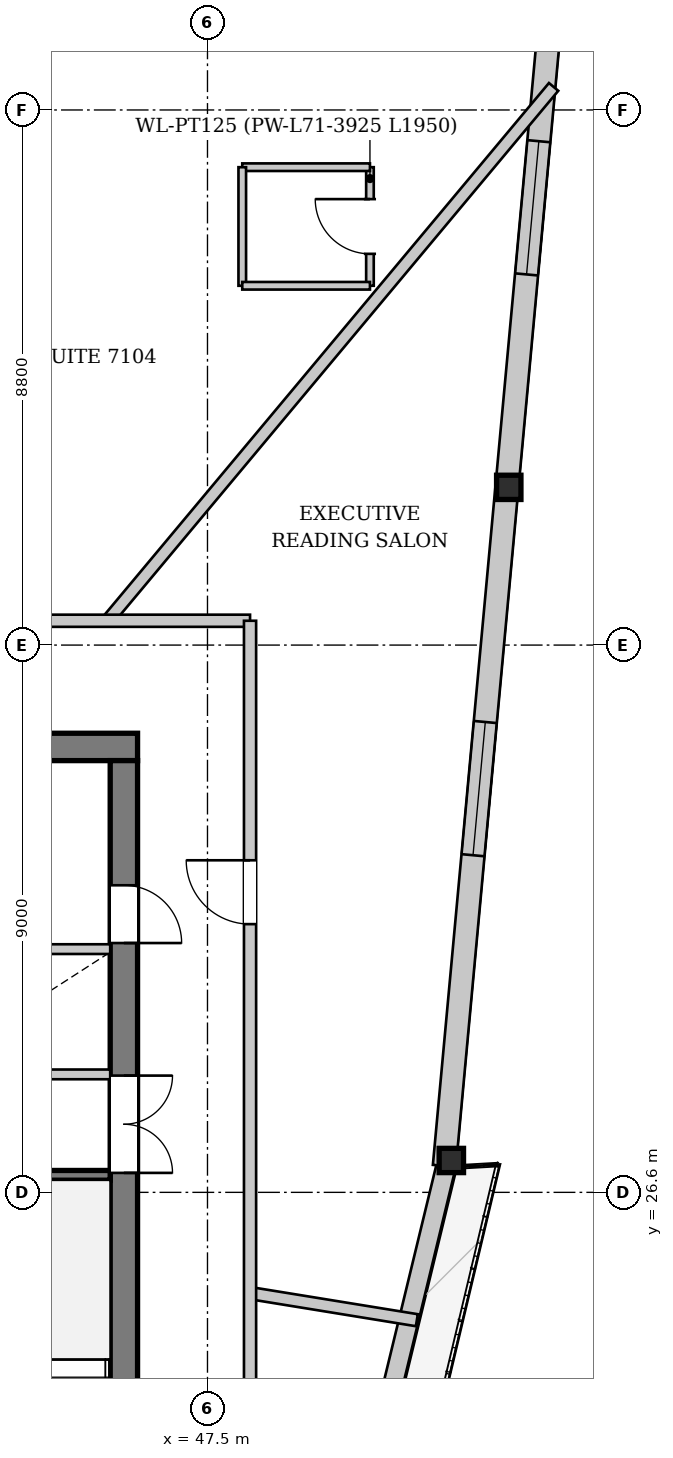
"""IFC4 building model, lengths in metres.
Left out: names, types, materials, properties, quantities, classifications, styles, units other than length and angle.
Written with IfcOpenShell. Run it as: python <this file> out.ifc"""

import sys

from ifc_helpers import new_model, si_unit, direction, frame, frame_2d, origin, origin_2d, place, context, subcontext, project, spatial, rectangle, i_section, extrude, source, transform, mapped, element, fill, save


model = new_model("IFC4")
c1 = context("Model", 3, precision=1e-05, world=origin(), true_north=direction((0.0, 1.0)))
c2 = subcontext(c1, "Body", "Model", "MODEL_VIEW")
j1 = project(units=[si_unit("LENGTHUNIT", "METRE"), si_unit("PLANEANGLEUNIT", "RADIAN")], contexts=[c1])
p1 = place(None, origin())
s1 = spatial("IfcSite", under=j1, at=p1, CompositionType="ELEMENT")
p2 = place(p1, origin())
s2 = spatial("IfcBuilding", under=s1, at=p2, CompositionType="ELEMENT")
p3 = place(p2, frame((0.0, 0.0, 266.9)))
s3 = spatial("IfcBuildingStorey", under=s2, at=p3, CompositionType="ELEMENT", Elevation=266.9)
m1 = source(origin(), c2, "Body", "SweptSolid", [
    extrude(i_section(OverallWidth=0.401, OverallDepth=0.399, WebThickness=0.022, FlangeThickness=0.034, at=origin_2d()), origin(), (0.0, 0.0, 1.0), 3.445),
])
p4 = place(p3, frame((51.585, 27.017, 0.0), z_axis=(-0.043442434865, 0.062151737972, 0.997120813302), x_axis=(-0.819626884118, -0.572897696653, 0.0)))
e1 = element("IfcColumn", 1, at=p4, inside=s3, PredefinedType="COLUMN", context=c2, shape_type="MappedRepresentation", body=[
    mapped(m1, transform((0.0, 0.0, 0.0), x_axis=(1.0, 0.0, 0.0), y_axis=(0.0, 1.0, 0.0), z_axis=(0.0, 0.0, 1.0), scale=1.0)),
])
m2 = source(origin(), c2, "Body", "SweptSolid", [
    extrude(i_section(OverallWidth=0.401, OverallDepth=0.399, WebThickness=0.022, FlangeThickness=0.034, at=origin_2d()), origin(), (0.0, 0.0, 1.0), 3.454),
])
p5 = place(p3, frame((52.607, 38.097, 0.0), z_axis=(-0.087933725964, 0.055912843438, 0.994555887709), x_axis=(-0.536568207746, -0.843856953776, 0.0)))
e2 = element("IfcColumn", 2, at=p5, inside=s3, PredefinedType="COLUMN", context=c2, shape_type="MappedRepresentation", body=[
    mapped(m2, transform((0.0, 0.0, 0.0), x_axis=(1.0, 0.0, 0.0), y_axis=(0.0, 1.0, 0.0), z_axis=(0.0, 0.0, 1.0), scale=1.0)),
])
p6 = place(p3, frame((51.43, 27.055, 0.0), z_axis=(0.0, 0.0, 1.0), x_axis=(-0.235712431361, -0.97182284893, 0.0)))
e3 = element("IfcWall", 3, at=p6, inside=s3, PredefinedType="SOLIDWALL", context=c2, shape_type="SweptSolid", body=[
    extrude(rectangle(XDim=22.254, YDim=0.32, at=frame_2d((11.127, 0.0))), origin(), (0.0, 0.0, 1.0), 2.872),
])
p7 = place(p6, frame((6.371, 0.0, 0.0)))
e4 = element("IfcOpeningElement", 4, at=p7, cuts=e3, PredefinedType="OPENING", context=c2, shape_type="SweptSolid", body=[
    extrude(rectangle(XDim=1.5, YDim=2.3, at=frame_2d((0.75, 1.15))), frame((0.0, 0.17, 0.0), z_axis=(0.0, -1.0, 0.0), x_axis=(1.0, 0.0, 0.0)), (0.0, 0.0, 1.0), 0.34),
])
p8 = place(p6, frame((15.168, 0.0, 0.402)))
e5 = element("IfcOpeningElement", 5, at=p8, cuts=e3, PredefinedType="OPENING", context=c2, shape_type="SweptSolid", body=[
    extrude(rectangle(XDim=2.6, YDim=2.35, at=frame_2d((1.3, 1.175))), frame((0.0, 0.17, 0.0), z_axis=(0.0, -1.0, 0.0), x_axis=(1.0, 0.0, 0.0)), (0.0, 0.0, 1.0), 0.34),
])
p9 = place(p3, frame((33.199, 39.501, 0.0), z_axis=(0.0, 0.0, 1.0), x_axis=(0.875716063216, 0.482826445658, 0.0)))
e6 = element("IfcWall", 6, at=p9, inside=s3, PredefinedType="SOLIDWALL", context=c2, shape_type="SweptSolid", body=[
    extrude(rectangle(XDim=21.738, YDim=0.32, at=frame_2d((10.869, 0.0))), origin(), (0.0, 0.0, 1.0), 2.872),
])
p10 = place(p9, frame((6.206, 0.0, 0.0)))
e7 = element("IfcOpeningElement", 7, at=p10, cuts=e6, PredefinedType="OPENING", context=c2, shape_type="SweptSolid", body=[
    extrude(rectangle(XDim=1.5, YDim=2.3, at=frame_2d((0.75, 1.15))), frame((0.0, 0.17, 0.0), z_axis=(0.0, -1.0, 0.0), x_axis=(1.0, 0.0, 0.0)), (0.0, 0.0, 1.0), 0.34),
])
p11 = place(p9, frame((14.786, 0.0, 0.402)))
e8 = element("IfcOpeningElement", 8, at=p11, cuts=e6, PredefinedType="OPENING", context=c2, shape_type="SweptSolid", body=[
    extrude(rectangle(XDim=2.6, YDim=2.35, at=frame_2d((1.3, 1.175))), frame((0.0, 0.17, 0.0), z_axis=(0.0, -1.0, 0.0), x_axis=(1.0, 0.0, 0.0)), (0.0, 0.0, 1.0), 0.34),
])
p12 = place(p3, frame((53.439, 49.195, 0.0), z_axis=(0.0, 0.0, 1.0), x_axis=(-0.091800782473, -0.995777392964, 0.0)))
e9 = element("IfcWall", 9, at=p12, inside=s3, PredefinedType="SOLIDWALL", context=c2, shape_type="SweptSolid", body=[
    extrude(rectangle(XDim=22.254, YDim=0.38, at=frame_2d((11.127, 0.0))), origin(), (0.0, 0.0, 1.0), 2.872),
])
p13 = place(p12, frame((5.331, 0.0, 0.502)))
e10 = element("IfcOpeningElement", 10, at=p13, cuts=e9, PredefinedType="OPENING", context=c2, shape_type="SweptSolid", body=[
    extrude(rectangle(XDim=2.2, YDim=2.25, at=frame_2d((1.1, 1.125))), frame((0.0, 0.2, 0.0), z_axis=(0.0, -1.0, 0.0), x_axis=(1.0, 0.0, 0.0)), (0.0, 0.0, 1.0), 0.4),
])
p14 = place(p12, frame((14.923, 0.0, 0.502)))
e11 = element("IfcOpeningElement", 11, at=p14, cuts=e9, PredefinedType="OPENING", context=c2, shape_type="SweptSolid", body=[
    extrude(rectangle(XDim=2.2, YDim=2.25, at=frame_2d((1.1, 1.125))), frame((0.0, 0.2, 0.0), z_axis=(0.0, -1.0, 0.0), x_axis=(1.0, 0.0, 0.0)), (0.0, 0.0, 1.0), 0.4),
])
p15 = place(p3, frame((29.65, 33.925, 0.0), z_axis=(0.0, 0.0, 1.0), x_axis=(1.0, 0.0, 0.0)))
e12 = element("IfcWall", 12, at=p15, inside=s3, PredefinedType="SHEAR", context=c2, shape_type="SweptSolid", body=[
    extrude(rectangle(XDim=16.7, YDim=0.45, at=frame_2d((8.35, 0.0))), origin(), (0.0, 0.0, 1.0), 3.38),
])
p16 = place(p15, frame((1.45, 0.0, 0.0)))
e13 = element("IfcOpeningElement", 13, at=p16, cuts=e12, PredefinedType="OPENING", context=c2, shape_type="SweptSolid", body=[
    extrude(rectangle(XDim=0.95, YDim=2.1, at=frame_2d((0.475, 1.05))), frame((0.0, 0.235, 0.0), z_axis=(0.0, -1.0, 0.0), x_axis=(1.0, 0.0, 0.0)), (0.0, 0.0, 1.0), 0.47),
])
p17 = place(p15, frame((3.83, 0.0, 0.0)))
e14 = element("IfcOpeningElement", 14, at=p17, cuts=e12, PredefinedType="OPENING", context=c2, shape_type="SweptSolid", body=[
    extrude(rectangle(XDim=1.32, YDim=2.2, at=frame_2d((0.66, 1.1))), frame((0.0, 0.235, 0.0), z_axis=(0.0, -1.0, 0.0), x_axis=(1.0, 0.0, 0.0)), (0.0, 0.0, 1.0), 0.47),
])
p18 = place(p3, frame((46.125, 33.7, 0.0), z_axis=(0.0, 0.0, 1.0), x_axis=(0.0, -1.0, 0.0)))
e15 = element("IfcWall", 15, at=p18, inside=s3, PredefinedType="SHEAR", context=c2, shape_type="SweptSolid", body=[
    extrude(rectangle(XDim=14.2, YDim=0.45, at=frame_2d((7.1, 0.0))), origin(), (0.0, 0.0, 1.0), 3.38),
])
p19 = place(p18, frame((5.18, 0.0, 0.0)))
e16 = element("IfcOpeningElement", 16, at=p19, cuts=e15, PredefinedType="OPENING", context=c2, shape_type="SweptSolid", body=[
    extrude(rectangle(XDim=1.6, YDim=2.2, at=frame_2d((0.8, 1.1))), frame((0.0, 0.235, 0.0), z_axis=(0.0, -1.0, 0.0), x_axis=(1.0, 0.0, 0.0)), (0.0, 0.0, 1.0), 0.47),
])
p20 = place(p18, frame((2.05, 0.0, 0.0)))
e17 = element("IfcOpeningElement", 17, at=p20, cuts=e15, PredefinedType="OPENING", context=c2, shape_type="SweptSolid", body=[
    extrude(rectangle(XDim=0.95, YDim=2.1, at=frame_2d((0.475, 1.05))), frame((0.0, 0.235, 0.0), z_axis=(0.0, -1.0, 0.0), x_axis=(1.0, 0.0, 0.0)), (0.0, 0.0, 1.0), 0.47),
])
p21 = place(p3, frame((42.88, 26.88, 0.0), z_axis=(0.0, 0.0, 1.0), x_axis=(1.0, 0.0, 0.0)))
e18 = element("IfcWall", 18, at=p21, inside=s3, PredefinedType="PARTITIONING", context=c2, shape_type="SweptSolid", body=[
    extrude(rectangle(XDim=3.02, YDim=0.16, at=frame_2d((1.51, 0.0))), origin(), (0.0, 0.0, 1.0), 3.38),
])
p22 = place(p3, frame((33.28, 28.54, 0.0), z_axis=(0.0, 0.0, 1.0), x_axis=(1.0, 0.0, 0.0)))
e19 = element("IfcWall", 19, at=p22, inside=s3, PredefinedType="PARTITIONING", context=c2, shape_type="SweptSolid", body=[
    extrude(rectangle(XDim=12.62, YDim=0.16, at=frame_2d((6.31, 0.0))), origin(), (0.0, 0.0, 1.0), 3.38),
])
p23 = place(p22, frame((0.26, 0.0, 0.0)))
e20 = element("IfcOpeningElement", 20, at=p23, cuts=e19, PredefinedType="OPENING", context=c2, shape_type="SweptSolid", body=[
    extrude(rectangle(XDim=1.1, YDim=2.2, at=frame_2d((0.55, 1.1))), frame((0.0, 0.09, 0.0), z_axis=(0.0, -1.0, 0.0), x_axis=(1.0, 0.0, 0.0)), (0.0, 0.0, 1.0), 0.18),
])
p24 = place(p22, frame((2.01, 0.0, 0.0)))
e21 = element("IfcOpeningElement", 21, at=p24, cuts=e19, PredefinedType="OPENING", context=c2, shape_type="SweptSolid", body=[
    extrude(rectangle(XDim=1.1, YDim=2.2, at=frame_2d((0.55, 1.1))), frame((0.0, 0.09, 0.0), z_axis=(0.0, -1.0, 0.0), x_axis=(1.0, 0.0, 0.0)), (0.0, 0.0, 1.0), 0.18),
])
p25 = place(p22, frame((3.76, 0.0, 0.0)))
e22 = element("IfcOpeningElement", 22, at=p25, cuts=e19, PredefinedType="OPENING", context=c2, shape_type="SweptSolid", body=[
    extrude(rectangle(XDim=1.1, YDim=2.2, at=frame_2d((0.55, 1.1))), frame((0.0, 0.09, 0.0), z_axis=(0.0, -1.0, 0.0), x_axis=(1.0, 0.0, 0.0)), (0.0, 0.0, 1.0), 0.18),
])
p26 = place(p3, frame((40.72, 30.6, 0.0), z_axis=(0.0, 0.0, 1.0), x_axis=(1.0, 0.0, 0.0)))
e23 = element("IfcWall", 23, at=p26, inside=s3, PredefinedType="PARTITIONING", context=c2, shape_type="SweptSolid", body=[
    extrude(rectangle(XDim=5.18, YDim=0.16, at=frame_2d((2.59, 0.0))), origin(), (0.0, 0.0, 1.0), 3.38),
])
p27 = place(p3, frame((48.2, 24.943, 0.0), z_axis=(0.0, 0.0, 1.0), x_axis=(0.987066811554, -0.160309418091, 0.0)))
e24 = element("IfcWall", 24, at=p27, inside=s3, PredefinedType="PARTITIONING", context=c2, shape_type="SweptSolid", body=[
    extrude(rectangle(XDim=2.779, YDim=0.2, at=frame_2d((1.39, 0.0))), origin(), (0.0, 0.0, 1.0), 3.38),
])
p28 = place(p3, frame((45.856, 36.0, 0.0), z_axis=(0.0, 0.0, 1.0), x_axis=(0.641258383764, 0.767325019305, 0.0)))
e25 = element("IfcWall", 25, at=p28, inside=s3, PredefinedType="PARTITIONING", context=c2, shape_type="SweptSolid", body=[
    extrude(rectangle(XDim=11.441, YDim=0.2, at=frame_2d((5.721, 0.0))), origin(), (0.0, 0.0, 1.0), 3.38),
])
p29 = place(p3, frame((50.172, 41.509, 0.0), z_axis=(0.0, 0.0, 1.0), x_axis=(0.0, 1.0, 0.0)))
e26 = element("IfcWall", 26, at=p29, inside=s3, PredefinedType="PARTITIONING", context=c2, shape_type="SweptSolid", body=[
    extrude(rectangle(XDim=1.95, YDim=0.125, at=frame_2d((0.975, 0.0))), origin(), (0.0, 0.0, 1.0), 3.38),
])
p30 = place(p29, frame((0.525, 0.0, 0.0)))
e27 = element("IfcOpeningElement", 27, at=p30, cuts=e26, PredefinedType="OPENING", context=c2, shape_type="SweptSolid", body=[
    extrude(rectangle(XDim=0.9, YDim=2.1, at=frame_2d((0.45, 1.05))), frame((0.0, 0.073, 0.0), z_axis=(0.0, -1.0, 0.0), x_axis=(1.0, 0.0, 0.0)), (0.0, 0.0, 1.0), 0.145),
])
p31 = place(p3, frame((50.172, 43.459, 0.0), z_axis=(0.0, 0.0, 1.0), x_axis=(-1.0, 0.0, 0.0)))
e28 = element("IfcWall", 28, at=p31, inside=s3, PredefinedType="PARTITIONING", context=c2, shape_type="SweptSolid", body=[
    extrude(rectangle(XDim=2.1, YDim=0.125, at=frame_2d((1.05, 0.0))), origin(), (0.0, 0.0, 1.0), 3.38),
])
p32 = place(p3, frame((48.072, 43.459, 0.0), z_axis=(0.0, 0.0, 1.0), x_axis=(0.0, -1.0, 0.0)))
e29 = element("IfcWall", 29, at=p32, inside=s3, PredefinedType="PARTITIONING", context=c2, shape_type="SweptSolid", body=[
    extrude(rectangle(XDim=1.95, YDim=0.125, at=frame_2d((0.975, 0.0))), origin(), (0.0, 0.0, 1.0), 3.055),
])
p33 = place(p3, frame((48.072, 41.509, 0.0), z_axis=(0.0, 0.0, 1.0), x_axis=(1.0, 0.0, 0.0)))
e30 = element("IfcWall", 30, at=p33, inside=s3, PredefinedType="PARTITIONING", context=c2, shape_type="SweptSolid", body=[
    extrude(rectangle(XDim=2.1, YDim=0.125, at=frame_2d((1.05, 0.0))), origin(), (0.0, 0.0, 1.0), 3.38),
])
p34 = place(p3, frame((43.4, 36.0, 0.0), z_axis=(0.0, 0.0, 1.0), x_axis=(1.0, 0.0, 0.0)))
e31 = element("IfcWall", 31, at=p34, inside=s3, PredefinedType="PARTITIONING", context=c2, shape_type="SweptSolid", body=[
    extrude(rectangle(XDim=4.8, YDim=0.2, at=frame_2d((2.4, 0.0))), origin(), (0.0, 0.0, 1.0), 3.38),
])
p35 = place(p3, frame((48.2, 17.2, 0.0), z_axis=(0.0, 0.0, 1.0), x_axis=(0.0, 1.0, 0.0)))
e32 = element("IfcWall", 32, at=p35, inside=s3, PredefinedType="PARTITIONING", context=c2, shape_type="SweptSolid", body=[
    extrude(rectangle(XDim=18.8, YDim=0.2, at=frame_2d((9.4, 0.0))), origin(), (0.0, 0.0, 1.0), 3.065),
])
p36 = place(p35, frame((0.3, 0.0, 0.0)))
e33 = element("IfcOpeningElement", 33, at=p36, cuts=e32, PredefinedType="OPENING", context=c2, shape_type="SweptSolid", body=[
    extrude(rectangle(XDim=1.05, YDim=2.2, at=frame_2d((0.525, 1.1))), frame((0.0, 0.11, 0.0), z_axis=(0.0, -1.0, 0.0), x_axis=(1.0, 0.0, 0.0)), (0.0, 0.0, 1.0), 0.22),
])
p37 = place(p35, frame((13.811, 0.0, 0.0)))
e34 = element("IfcOpeningElement", 34, at=p37, cuts=e32, PredefinedType="OPENING", context=c2, shape_type="SweptSolid", body=[
    extrude(rectangle(XDim=1.05, YDim=2.2, at=frame_2d((0.525, 1.1))), frame((0.0, 0.11, 0.0), z_axis=(0.0, -1.0, 0.0), x_axis=(1.0, 0.0, 0.0)), (0.0, 0.0, 1.0), 0.22),
])
m3 = source(origin(), c2, "Body", "SweptSolid", [
    extrude(rectangle(XDim=2.2, YDim=2.25, at=frame_2d((1.1, 1.125))), frame((0.0, 0.03, 0.0), z_axis=(0.0, -1.0, 0.0), x_axis=(1.0, 0.0, 0.0)), (0.0, 0.0, 1.0), 0.06),
])
p38 = place(p13, origin())
e35 = element("IfcWindow", 35, at=p38, inside=s3, PartitioningType="SINGLE_PANEL", PredefinedType="WINDOW", context=c2, shape_type="MappedRepresentation", body=[
    mapped(m3, transform((0.0, 0.0, 0.0), x_axis=(1.0, 0.0, 0.0), y_axis=(0.0, 1.0, 0.0), z_axis=(0.0, 0.0, 1.0), scale=1.0)),
])
fill(e10, e35)
p39 = place(p14, origin())
e36 = element("IfcWindow", 36, at=p39, inside=s3, PartitioningType="SINGLE_PANEL", PredefinedType="WINDOW", context=c2, shape_type="MappedRepresentation", body=[
    mapped(m3, transform((0.0, 0.0, 0.0), x_axis=(1.0, 0.0, 0.0), y_axis=(0.0, 1.0, 0.0), z_axis=(0.0, 0.0, 1.0), scale=1.0)),
])
fill(e11, e36)
m4 = source(origin(), c2, "Body", "SweptSolid", [
    extrude(rectangle(XDim=1.6, YDim=2.2, at=frame_2d((0.8, 1.1))), frame((0.0, 0.025, 0.0), z_axis=(0.0, -1.0, 0.0), x_axis=(1.0, 0.0, 0.0)), (0.0, 0.0, 1.0), 0.05),
])
p40 = place(p19, origin())
e37 = element("IfcDoor", 37, at=p40, inside=s3, OperationType="DOUBLE_DOOR_SINGLE_SWING", PredefinedType="DOOR", context=c2, shape_type="MappedRepresentation", body=[
    mapped(m4, transform((0.0, 0.0, 0.0), x_axis=(1.0, 0.0, 0.0), y_axis=(0.0, 1.0, 0.0), z_axis=(0.0, 0.0, 1.0), scale=1.0)),
])
fill(e16, e37)
m5 = source(origin(), c2, "Body", "SweptSolid", [
    extrude(rectangle(XDim=0.95, YDim=2.1, at=frame_2d((0.475, 1.05))), frame((0.0, 0.025, 0.0), z_axis=(0.0, -1.0, 0.0), x_axis=(1.0, 0.0, 0.0)), (0.0, 0.0, 1.0), 0.05),
])
p41 = place(p20, origin())
e38 = element("IfcDoor", 38, at=p41, inside=s3, OperationType="SINGLE_SWING_RIGHT", PredefinedType="DOOR", context=c2, shape_type="MappedRepresentation", body=[
    mapped(m5, transform((0.0, 0.0, 0.0), x_axis=(1.0, 0.0, 0.0), y_axis=(0.0, 1.0, 0.0), z_axis=(0.0, 0.0, 1.0), scale=1.0)),
])
fill(e17, e38)
m6 = source(origin(), c2, "Body", "SweptSolid", [
    extrude(rectangle(XDim=0.9, YDim=2.1, at=frame_2d((0.45, 1.05))), frame((0.0, 0.025, 0.0), z_axis=(0.0, -1.0, 0.0), x_axis=(1.0, 0.0, 0.0)), (0.0, 0.0, 1.0), 0.05),
])
p42 = place(p30, origin())
e39 = element("IfcDoor", 39, at=p42, inside=s3, OperationType="SINGLE_SWING_RIGHT", PredefinedType="DOOR", context=c2, shape_type="MappedRepresentation", body=[
    mapped(m6, transform((0.0, 0.0, 0.0), x_axis=(1.0, 0.0, 0.0), y_axis=(0.0, 1.0, 0.0), z_axis=(0.0, 0.0, 1.0), scale=1.0)),
])
fill(e27, e39)
m7 = source(origin(), c2, "Body", "SweptSolid", [
    extrude(rectangle(XDim=1.05, YDim=2.2, at=frame_2d((0.525, 1.1))), frame((0.0, 0.025, 0.0), z_axis=(0.0, -1.0, 0.0), x_axis=(1.0, 0.0, 0.0)), (0.0, 0.0, 1.0), 0.05),
])
p43 = place(p37, origin())
e40 = element("IfcDoor", 40, at=p43, inside=s3, OperationType="SINGLE_SWING_RIGHT", PredefinedType="DOOR", context=c2, shape_type="MappedRepresentation", body=[
    mapped(m7, transform((0.0, 0.0, 0.0), x_axis=(1.0, 0.0, 0.0), y_axis=(0.0, 1.0, 0.0), z_axis=(0.0, 0.0, 1.0), scale=1.0)),
])
fill(e34, e40)
save(model, sys.argv[1])
